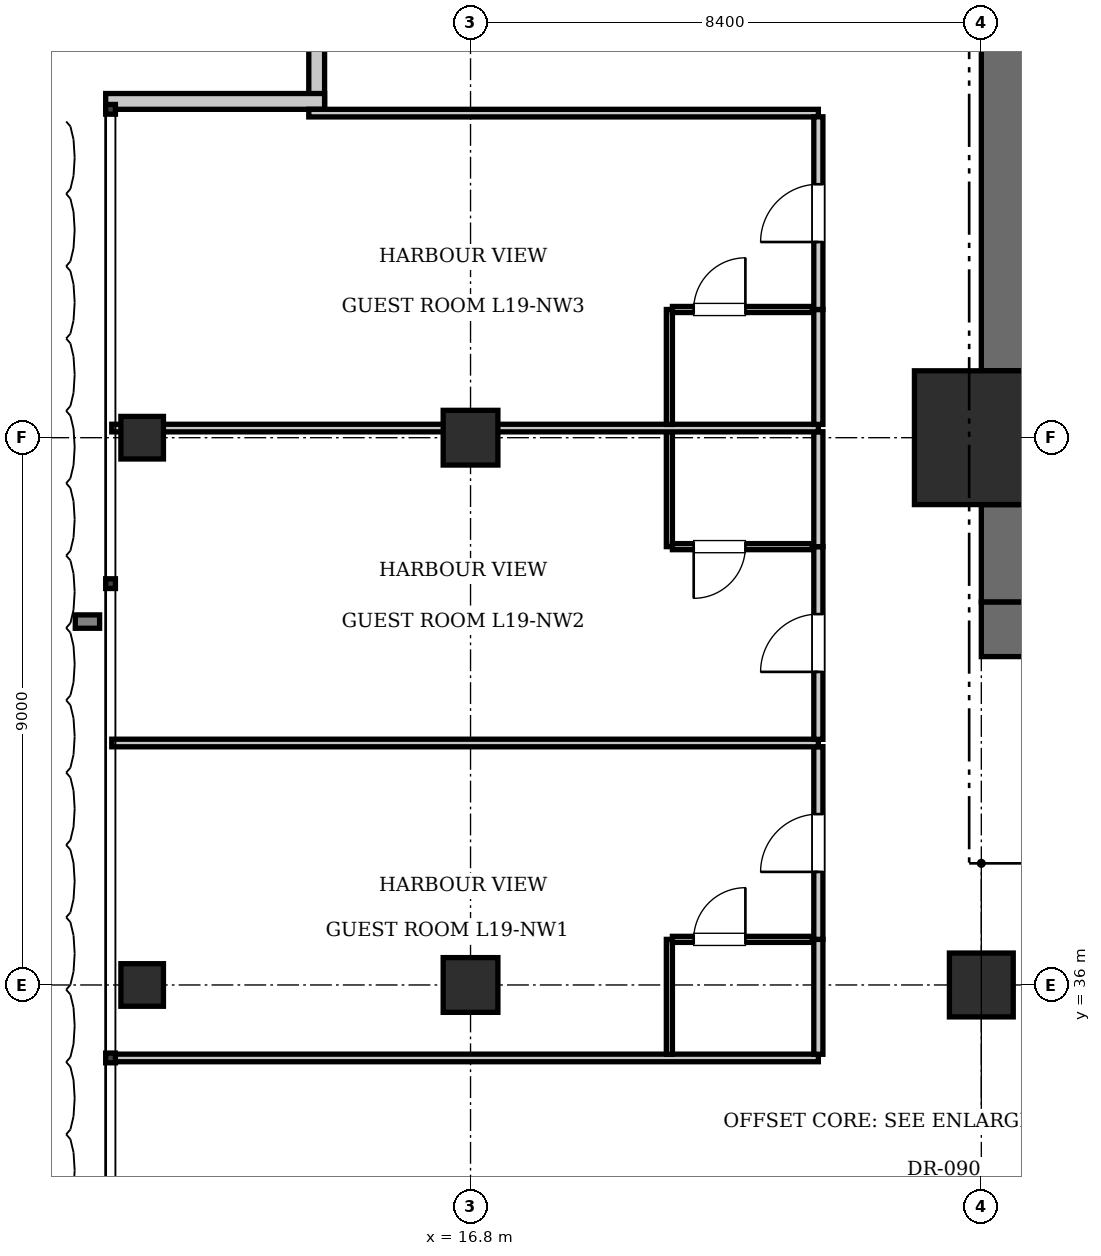
"""IFC4 building model, lengths in metres.
Left out: names, types, materials, properties, quantities, classifications, styles, units other than length and angle.
Written with IfcOpenShell. Run it as: python <this file> out.ifc"""

import sys

from ifc_helpers import new_model, si_unit, direction, frame, frame_2d, origin, origin_2d, place, context, subcontext, project, spatial, rectangle, i_section, extrude, element, fill, save


model = new_model("IFC4")
c1 = context("Model", 3, precision=1e-05, world=origin(), true_north=direction((0.0, 1.0)))
c2 = subcontext(c1, "Body", "Model", "MODEL_VIEW")
j1 = project(units=[si_unit("LENGTHUNIT", "METRE"), si_unit("PLANEANGLEUNIT", "RADIAN")], contexts=[c1])
p1 = place(None, origin())
s1 = spatial("IfcSite", under=j1, at=p1, CompositionType="ELEMENT")
p2 = place(p1, origin())
s2 = spatial("IfcBuilding", under=s1, at=p2, CompositionType="ELEMENT")
p3 = place(p2, frame((0.0, 0.0, 80.85)))
s3 = spatial("IfcBuildingStorey", under=s2, at=p3, CompositionType="ELEMENT", Elevation=80.85)
p4 = place(p3, frame((25.2, 45.0, 0.0), z_axis=(0.0, 0.0, 1.0), x_axis=(1.0, 0.0, 0.0)))
e1 = element("IfcColumn", 1, at=p4, inside=s3, PredefinedType="COLUMN", context=c2, shape_type="SweptSolid", body=[
    extrude(rectangle(XDim=2.2, YDim=2.2, at=origin_2d()), origin(), (0.0, 0.0, 1.0), 3.85),
])
p5 = place(p3, frame((25.2, 41.85, 0.0), z_axis=(0.0, 0.0, 1.0), x_axis=(1.0, 0.0, 0.0)))
e2 = element("IfcWall", 2, at=p5, inside=s3, PredefinedType="SHEAR", context=c2, shape_type="SweptSolid", body=[
    extrude(rectangle(XDim=6.8, YDim=0.9, at=frame_2d((3.4, 0.0))), origin(), (0.0, 0.0, 1.0), 3.85),
])
p6 = place(p5, frame((1.65, 0.0, 0.0)))
e3 = element("IfcOpeningElement", 3, at=p6, cuts=e2, PredefinedType="OPENING", context=c2, shape_type="SweptSolid", body=[
    extrude(rectangle(XDim=1.15, YDim=2.15, at=frame_2d((0.575, 1.075))), frame((0.0, 0.46, 0.0), z_axis=(0.0, -1.0, 0.0), x_axis=(1.0, 0.0, 0.0)), (0.0, 0.0, 1.0), 0.92),
])
p7 = place(p5, frame((5.15, 0.0, 0.0)))
e4 = element("IfcOpeningElement", 4, at=p7, cuts=e2, PredefinedType="OPENING", context=c2, shape_type="SweptSolid", body=[
    extrude(rectangle(XDim=1.1, YDim=2.2, at=frame_2d((0.55, 1.1))), frame((0.0, 0.46, 0.0), z_axis=(0.0, -1.0, 0.0), x_axis=(1.0, 0.0, 0.0)), (0.0, 0.0, 1.0), 0.92),
])
p8 = place(p3, frame((25.65, 42.3, 0.0), z_axis=(0.0, 0.0, 1.0), x_axis=(0.0, 1.0, 0.0)))
e5 = element("IfcWall", 5, at=p8, inside=s3, PredefinedType="SHEAR", context=c2, shape_type="SweptSolid", body=[
    extrude(rectangle(XDim=1.6, YDim=0.9, at=frame_2d((0.8, 0.0))), origin(), (0.0, 0.0, 1.0), 3.85),
])
p9 = place(p3, frame((25.65, 46.1, 0.0), z_axis=(0.0, 0.0, 1.0), x_axis=(0.0, 1.0, 0.0)))
e6 = element("IfcWall", 6, at=p9, inside=s3, PredefinedType="SHEAR", context=c2, shape_type="SweptSolid", body=[
    extrude(rectangle(XDim=7.0, YDim=0.9, at=frame_2d((3.5, 0.0))), origin(), (0.0, 0.0, 1.0), 3.85),
])
p10 = place(p3, frame((25.2, 36.0, 0.0), z_axis=(0.0, 0.0, 1.0), x_axis=(1.0, 0.0, 0.0)))
e7 = element("IfcColumn", 7, at=p10, inside=s3, PredefinedType="COLUMN", context=c2, shape_type="SweptSolid", body=[
    extrude(rectangle(XDim=1.05, YDim=1.05, at=origin_2d()), origin(), (0.0, 0.0, 1.0), 3.85),
])
for number, where, z_axis, x_axis in (
    (8, (16.8, 36.0, 0.0), (0.0, 0.0, 1.0), (1.0, 0.0, 0.0)),
    (9, (16.8, 45.0, 0.0), (0.0, 0.0, 1.0), (1.0, 0.0, 0.0)),
):
    element("IfcColumn", number, at=place(p3, frame(where, z_axis=z_axis, x_axis=x_axis)), inside=s3, PredefinedType="COLUMN", context=c2, shape_type="SweptSolid", body=[
        extrude(rectangle(XDim=0.9, YDim=0.9, at=origin_2d()), origin(), (0.0, 0.0, 1.0), 3.85),
    ])
for number, where, z_axis, x_axis in (
    (10, (11.4, 36.0, 0.0), (0.0, 0.0, 1.0), (1.0, 0.0, 0.0)),
    (11, (11.4, 45.0, 0.0), (0.0, 0.0, 1.0), (1.0, 0.0, 0.0)),
):
    element("IfcColumn", number, at=place(p3, frame(where, z_axis=z_axis, x_axis=x_axis)), inside=s3, PredefinedType="COLUMN", context=c2, shape_type="SweptSolid", body=[
        extrude(i_section(OverallWidth=0.7, OverallDepth=0.7, WebThickness=0.028, FlangeThickness=0.044, at=origin_2d()), origin(), (0.0, 0.0, 1.0), 3.85),
    ])
p11 = place(p3, frame((14.27, 50.4, 0.0), z_axis=(0.0, 0.0, 1.0), x_axis=(0.0, 1.0, 0.0)))
e12 = element("IfcWall", 12, at=p11, inside=s3, PredefinedType="SOLIDWALL", context=c2, shape_type="SweptSolid", body=[
    extrude(rectangle(XDim=3.6, YDim=0.26, at=frame_2d((1.8, 0.0))), origin(), (0.0, 0.0, 1.0), 3.61),
])
p12 = place(p3, frame((10.8, 50.53, 0.0), z_axis=(0.0, 0.0, 1.0), x_axis=(1.0, 0.0, 0.0)))
e13 = element("IfcWall", 13, at=p12, inside=s3, PredefinedType="SOLIDWALL", context=c2, shape_type="SweptSolid", body=[
    extrude(rectangle(XDim=3.6, YDim=0.26, at=frame_2d((1.8, 0.0))), origin(), (0.0, 0.0, 1.0), 3.61),
])
p13 = place(p3, frame((10.9, 34.8, 0.0), z_axis=(0.0, 0.0, 1.0), x_axis=(1.0, 0.0, 0.0)))
e14 = element("IfcWall", 14, at=p13, inside=s3, PredefinedType="PARTITIONING", context=c2, shape_type="SweptSolid", body=[
    extrude(rectangle(XDim=11.62, YDim=0.125, at=frame_2d((5.81, 0.0))), origin(), (0.0, 0.0, 1.0), 3.61),
])
p14 = place(p3, frame((14.14, 50.337, 0.0), z_axis=(0.0, 0.0, 1.0), x_axis=(1.0, 0.0, 0.0)))
e15 = element("IfcWall", 15, at=p14, inside=s3, PredefinedType="PARTITIONING", context=c2, shape_type="SweptSolid", body=[
    extrude(rectangle(XDim=8.38, YDim=0.125, at=frame_2d((4.19, 0.0))), origin(), (0.0, 0.0, 1.0), 3.61),
])
p15 = place(p3, frame((22.52, 34.86, 0.0), z_axis=(0.0, 0.0, 1.0), x_axis=(0.0, 1.0, 0.0)))
e16 = element("IfcWall", 16, at=p15, inside=s3, PredefinedType="PARTITIONING", context=c2, shape_type="SweptSolid", body=[
    extrude(rectangle(XDim=1.89, YDim=0.15, at=frame_2d((0.945, 0.0))), origin(), (0.0, 0.0, 1.0), 3.61),
])
p16 = place(p3, frame((22.52, 36.75, 0.0), z_axis=(0.0, 0.0, 1.0), x_axis=(0.0, 1.0, 0.0)))
e17 = element("IfcWall", 17, at=p16, inside=s3, PredefinedType="PARTITIONING", context=c2, shape_type="SweptSolid", body=[
    extrude(rectangle(XDim=3.169, YDim=0.15, at=frame_2d((1.584, 0.0))), origin(), (0.0, 0.0, 1.0), 3.61),
])
p17 = place(p16, frame((1.11, 0.0, 0.0)))
e18 = element("IfcOpeningElement", 18, at=p17, cuts=e17, PredefinedType="OPENING", context=c2, shape_type="SweptSolid", body=[
    extrude(rectangle(XDim=0.95, YDim=2.15, at=frame_2d((0.475, 1.075))), frame((0.0, 0.085, 0.0), z_axis=(0.0, -1.0, 0.0), x_axis=(1.0, 0.0, 0.0)), (0.0, 0.0, 1.0), 0.17),
])
p18 = place(p3, frame((20.07, 34.86, 0.0), z_axis=(0.0, 0.0, 1.0), x_axis=(0.0, 1.0, 0.0)))
e19 = element("IfcWall", 19, at=p18, inside=s3, PredefinedType="PARTITIONING", context=c2, shape_type="SweptSolid", body=[
    extrude(rectangle(XDim=1.89, YDim=0.1, at=frame_2d((0.945, 0.0))), origin(), (0.0, 0.0, 1.0), 3.61),
])
p19 = place(p3, frame((20.12, 36.75, 0.0), z_axis=(0.0, 0.0, 1.0), x_axis=(1.0, 0.0, 0.0)))
e20 = element("IfcWall", 20, at=p19, inside=s3, PredefinedType="PARTITIONING", context=c2, shape_type="SweptSolid", body=[
    extrude(rectangle(XDim=2.3, YDim=0.1, at=frame_2d((1.15, 0.0))), origin(), (0.0, 0.0, 1.0), 3.61),
])
p20 = place(p19, frame((0.35, 0.0, 0.0)))
e21 = element("IfcOpeningElement", 21, at=p20, cuts=e20, PredefinedType="OPENING", context=c2, shape_type="SweptSolid", body=[
    extrude(rectangle(XDim=0.85, YDim=2.1, at=frame_2d((0.425, 1.05))), frame((0.0, 0.06, 0.0), z_axis=(0.0, -1.0, 0.0), x_axis=(1.0, 0.0, 0.0)), (0.0, 0.0, 1.0), 0.12),
])
p21 = place(p3, frame((10.9, 39.979, 0.0), z_axis=(0.0, 0.0, 1.0), x_axis=(1.0, 0.0, 0.0)))
e22 = element("IfcWall", 22, at=p21, inside=s3, PredefinedType="PARTITIONING", context=c2, shape_type="SweptSolid", body=[
    extrude(rectangle(XDim=11.62, YDim=0.125, at=frame_2d((5.81, 0.0))), origin(), (0.0, 0.0, 1.0), 3.61),
])
p22 = place(p3, frame((22.52, 40.039, 0.0), z_axis=(0.0, 0.0, 1.0), x_axis=(0.0, 1.0, 0.0)))
e23 = element("IfcWall", 23, at=p22, inside=s3, PredefinedType="PARTITIONING", context=c2, shape_type="SweptSolid", body=[
    extrude(rectangle(XDim=3.169, YDim=0.15, at=frame_2d((1.584, 0.0))), origin(), (0.0, 0.0, 1.0), 3.61),
])
p23 = place(p22, frame((1.11, 0.0, 0.0)))
e24 = element("IfcOpeningElement", 24, at=p23, cuts=e23, PredefinedType="OPENING", context=c2, shape_type="SweptSolid", body=[
    extrude(rectangle(XDim=0.95, YDim=2.15, at=frame_2d((0.475, 1.075))), frame((0.0, 0.085, 0.0), z_axis=(0.0, -1.0, 0.0), x_axis=(1.0, 0.0, 0.0)), (0.0, 0.0, 1.0), 0.17),
])
p24 = place(p3, frame((22.52, 43.208, 0.0), z_axis=(0.0, 0.0, 1.0), x_axis=(0.0, 1.0, 0.0)))
e25 = element("IfcWall", 25, at=p24, inside=s3, PredefinedType="PARTITIONING", context=c2, shape_type="SweptSolid", body=[
    extrude(rectangle(XDim=1.89, YDim=0.15, at=frame_2d((0.945, 0.0))), origin(), (0.0, 0.0, 1.0), 3.61),
])
p25 = place(p3, frame((20.07, 43.208, 0.0), z_axis=(0.0, 0.0, 1.0), x_axis=(0.0, 1.0, 0.0)))
e26 = element("IfcWall", 26, at=p25, inside=s3, PredefinedType="PARTITIONING", context=c2, shape_type="SweptSolid", body=[
    extrude(rectangle(XDim=1.89, YDim=0.1, at=frame_2d((0.945, 0.0))), origin(), (0.0, 0.0, 1.0), 3.61),
])
p26 = place(p3, frame((20.12, 43.208, 0.0), z_axis=(0.0, 0.0, 1.0), x_axis=(1.0, 0.0, 0.0)))
e27 = element("IfcWall", 27, at=p26, inside=s3, PredefinedType="PARTITIONING", context=c2, shape_type="SweptSolid", body=[
    extrude(rectangle(XDim=2.3, YDim=0.1, at=frame_2d((1.15, 0.0))), origin(), (0.0, 0.0, 1.0), 3.61),
])
p27 = place(p26, frame((0.35, 0.0, 0.0)))
e28 = element("IfcOpeningElement", 28, at=p27, cuts=e27, PredefinedType="OPENING", context=c2, shape_type="SweptSolid", body=[
    extrude(rectangle(XDim=0.85, YDim=2.1, at=frame_2d((0.425, 1.05))), frame((0.0, 0.06, 0.0), z_axis=(0.0, -1.0, 0.0), x_axis=(1.0, 0.0, 0.0)), (0.0, 0.0, 1.0), 0.12),
])
p28 = place(p3, frame((10.9, 45.158, 0.0), z_axis=(0.0, 0.0, 1.0), x_axis=(1.0, 0.0, 0.0)))
e29 = element("IfcWall", 29, at=p28, inside=s3, PredefinedType="PARTITIONING", context=c2, shape_type="SweptSolid", body=[
    extrude(rectangle(XDim=11.62, YDim=0.125, at=frame_2d((5.81, 0.0))), origin(), (0.0, 0.0, 1.0), 2.999),
])
p29 = place(p3, frame((22.52, 45.218, 0.0), z_axis=(0.0, 0.0, 1.0), x_axis=(0.0, 1.0, 0.0)))
e30 = element("IfcWall", 30, at=p29, inside=s3, PredefinedType="PARTITIONING", context=c2, shape_type="SweptSolid", body=[
    extrude(rectangle(XDim=1.89, YDim=0.15, at=frame_2d((0.945, 0.0))), origin(), (0.0, 0.0, 1.0), 3.61),
])
p30 = place(p3, frame((22.52, 47.108, 0.0), z_axis=(0.0, 0.0, 1.0), x_axis=(0.0, 1.0, 0.0)))
e31 = element("IfcWall", 31, at=p30, inside=s3, PredefinedType="PARTITIONING", context=c2, shape_type="SweptSolid", body=[
    extrude(rectangle(XDim=3.169, YDim=0.15, at=frame_2d((1.584, 0.0))), origin(), (0.0, 0.0, 1.0), 3.61),
])
p31 = place(p30, frame((1.11, 0.0, 0.0)))
e32 = element("IfcOpeningElement", 32, at=p31, cuts=e31, PredefinedType="OPENING", context=c2, shape_type="SweptSolid", body=[
    extrude(rectangle(XDim=0.95, YDim=2.15, at=frame_2d((0.475, 1.075))), frame((0.0, 0.085, 0.0), z_axis=(0.0, -1.0, 0.0), x_axis=(1.0, 0.0, 0.0)), (0.0, 0.0, 1.0), 0.17),
])
p32 = place(p3, frame((20.07, 45.218, 0.0), z_axis=(0.0, 0.0, 1.0), x_axis=(0.0, 1.0, 0.0)))
e33 = element("IfcWall", 33, at=p32, inside=s3, PredefinedType="PARTITIONING", context=c2, shape_type="SweptSolid", body=[
    extrude(rectangle(XDim=1.89, YDim=0.1, at=frame_2d((0.945, 0.0))), origin(), (0.0, 0.0, 1.0), 3.61),
])
p33 = place(p3, frame((20.12, 47.108, 0.0), z_axis=(0.0, 0.0, 1.0), x_axis=(1.0, 0.0, 0.0)))
e34 = element("IfcWall", 34, at=p33, inside=s3, PredefinedType="PARTITIONING", context=c2, shape_type="SweptSolid", body=[
    extrude(rectangle(XDim=2.3, YDim=0.1, at=frame_2d((1.15, 0.0))), origin(), (0.0, 0.0, 1.0), 3.61),
])
p34 = place(p33, frame((0.35, 0.0, 0.0)))
e35 = element("IfcOpeningElement", 35, at=p34, cuts=e34, PredefinedType="OPENING", context=c2, shape_type="SweptSolid", body=[
    extrude(rectangle(XDim=0.85, YDim=2.1, at=frame_2d((0.425, 1.05))), frame((0.0, 0.06, 0.0), z_axis=(0.0, -1.0, 0.0), x_axis=(1.0, 0.0, 0.0)), (0.0, 0.0, 1.0), 0.12),
])
p35 = place(p20, origin())
e36 = element("IfcDoor", 36, at=p35, inside=s3, OperationType="SINGLE_SWING_RIGHT", PredefinedType="DOOR", context=c2, shape_type="SweptSolid", body=[
    extrude(rectangle(XDim=0.85, YDim=2.1, at=frame_2d((0.425, 1.05))), frame((0.0, 0.025, 0.0), z_axis=(0.0, -1.0, 0.0), x_axis=(1.0, 0.0, 0.0)), (0.0, 0.0, 1.0), 0.05),
])
fill(e21, e36)
p36 = place(p17, origin())
e37 = element("IfcDoor", 37, at=p36, inside=s3, OperationType="SINGLE_SWING_LEFT", PredefinedType="DOOR", context=c2, shape_type="SweptSolid", body=[
    extrude(rectangle(XDim=0.95, YDim=2.15, at=frame_2d((0.475, 1.075))), frame((0.0, 0.025, 0.0), z_axis=(0.0, -1.0, 0.0), x_axis=(1.0, 0.0, 0.0)), (0.0, 0.0, 1.0), 0.05),
])
fill(e18, e37)
p37 = place(p27, frame((0.85, 0.0, 0.0), z_axis=(0.0, 0.0, 1.0), x_axis=(-1.0, 0.0, 0.0)))
e38 = element("IfcDoor", 38, at=p37, inside=s3, OperationType="SINGLE_SWING_RIGHT", PredefinedType="DOOR", context=c2, shape_type="SweptSolid", body=[
    extrude(rectangle(XDim=0.85, YDim=2.1, at=frame_2d((0.425, 1.05))), frame((0.0, 0.025, 0.0), z_axis=(0.0, -1.0, 0.0), x_axis=(1.0, 0.0, 0.0)), (0.0, 0.0, 1.0), 0.05),
])
fill(e28, e38)
p38 = place(p23, origin())
e39 = element("IfcDoor", 39, at=p38, inside=s3, OperationType="SINGLE_SWING_LEFT", PredefinedType="DOOR", context=c2, shape_type="SweptSolid", body=[
    extrude(rectangle(XDim=0.95, YDim=2.15, at=frame_2d((0.475, 1.075))), frame((0.0, 0.025, 0.0), z_axis=(0.0, -1.0, 0.0), x_axis=(1.0, 0.0, 0.0)), (0.0, 0.0, 1.0), 0.05),
])
fill(e24, e39)
p39 = place(p34, origin())
e40 = element("IfcDoor", 40, at=p39, inside=s3, OperationType="SINGLE_SWING_RIGHT", PredefinedType="DOOR", context=c2, shape_type="SweptSolid", body=[
    extrude(rectangle(XDim=0.85, YDim=2.1, at=frame_2d((0.425, 1.05))), frame((0.0, 0.025, 0.0), z_axis=(0.0, -1.0, 0.0), x_axis=(1.0, 0.0, 0.0)), (0.0, 0.0, 1.0), 0.05),
])
fill(e35, e40)
p40 = place(p31, origin())
e41 = element("IfcDoor", 41, at=p40, inside=s3, OperationType="SINGLE_SWING_LEFT", PredefinedType="DOOR", context=c2, shape_type="SweptSolid", body=[
    extrude(rectangle(XDim=0.95, YDim=2.15, at=frame_2d((0.475, 1.075))), frame((0.0, 0.025, 0.0), z_axis=(0.0, -1.0, 0.0), x_axis=(1.0, 0.0, 0.0)), (0.0, 0.0, 1.0), 0.05),
])
fill(e32, e41)
save(model, sys.argv[1])
